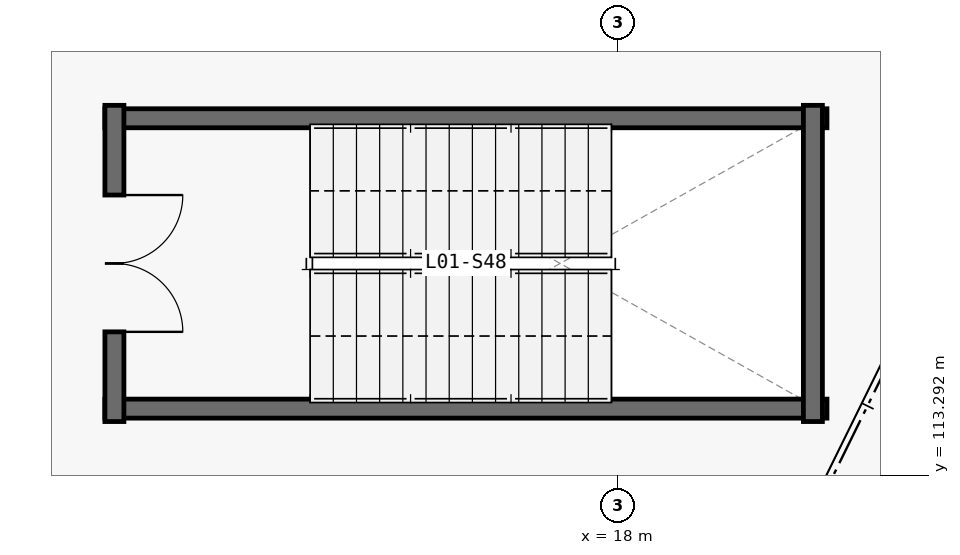
"""IFC4 building model, lengths in metres.
Left out: names, types, materials, properties, quantities, classifications, styles, units other than length and angle.
Written with IfcOpenShell. Run it as: python <this file> out.ifc"""

import sys

from ifc_helpers import new_model, si_unit, direction, frame, frame_2d, origin, place, context, subcontext, project, spatial, rectangle, extrude, element, fill, save


model = new_model("IFC4")
c1 = context("Model", 3, precision=1e-05, world=origin(), true_north=direction((0.0, 1.0)))
c2 = subcontext(c1, "Body", "Model", "MODEL_VIEW")
j1 = project(units=[si_unit("LENGTHUNIT", "METRE"), si_unit("PLANEANGLEUNIT", "RADIAN")], contexts=[c1])
p1 = place(None, origin())
s1 = spatial("IfcSite", under=j1, at=p1, CompositionType="ELEMENT")
p2 = place(p1, origin())
s2 = spatial("IfcBuilding", under=s1, at=p2, CompositionType="ELEMENT")
p3 = place(p2, frame((0.0, 0.0, 5.4)))
s3 = spatial("IfcBuildingStorey", under=s2, at=p3, CompositionType="ELEMENT", Elevation=5.4)
for number, where, z_axis, x_axis in (
    (1, (11.25, 114.17, 0.0), (0.0, 0.0, 1.0), (1.0, 0.0, 0.0)),
    (2, (20.75, 117.99, 0.0), (0.0, 0.0, 1.0), (-1.0, 0.0, 0.0)),
):
    element("IfcWall", number, at=place(p3, frame(where, z_axis=z_axis, x_axis=x_axis)), inside=s3, PredefinedType="SHEAR", context=c2, shape_type="SweptSolid", body=[
        extrude(rectangle(XDim=9.5, YDim=0.25, at=frame_2d((4.75, 0.0))), origin(), (0.0, 0.0, 1.0), 4.52),
    ])
p4 = place(p3, frame((11.375, 118.16, 0.0), z_axis=(0.0, 0.0, 1.0), x_axis=(0.0, -1.0, 0.0)))
e3 = element("IfcWall", 3, at=p4, inside=s3, PredefinedType="SHEAR", context=c2, shape_type="SweptSolid", body=[
    extrude(rectangle(XDim=4.16, YDim=0.25, at=frame_2d((2.08, 0.0))), origin(), (0.0, 0.0, 1.0), 4.52),
])
p5 = place(p4, frame((1.18, 0.0, 0.0)))
e4 = element("IfcOpeningElement", 4, at=p5, cuts=e3, PredefinedType="OPENING", context=c2, shape_type="SweptSolid", body=[
    extrude(rectangle(XDim=1.8, YDim=2.25, at=frame_2d((0.9, 1.125))), frame((0.0, 0.135, 0.0), z_axis=(0.0, -1.0, 0.0), x_axis=(1.0, 0.0, 0.0)), (0.0, 0.0, 1.0), 0.27),
])
p6 = place(p3, frame((20.565, 114.0, 0.0), z_axis=(0.0, 0.0, 1.0), x_axis=(0.0, 1.0, 0.0)))
e5 = element("IfcWall", 5, at=p6, inside=s3, PredefinedType="SHEAR", context=c2, shape_type="SweptSolid", body=[
    extrude(rectangle(XDim=4.16, YDim=0.25, at=frame_2d((2.08, 0.0))), origin(), (0.0, 0.0, 1.0), 4.52),
])
p7 = place(p5, origin())
e6 = element("IfcDoor", 6, at=p7, inside=s3, OperationType="DOUBLE_DOOR_SINGLE_SWING", PredefinedType="DOOR", context=c2, shape_type="SweptSolid", body=[
    extrude(rectangle(XDim=1.8, YDim=2.25, at=frame_2d((0.9, 1.125))), frame((0.0, 0.025, 0.0), z_axis=(0.0, -1.0, 0.0), x_axis=(1.0, 0.0, 0.0)), (0.0, 0.0, 1.0), 0.05),
])
fill(e4, e6)
save(model, sys.argv[1])
